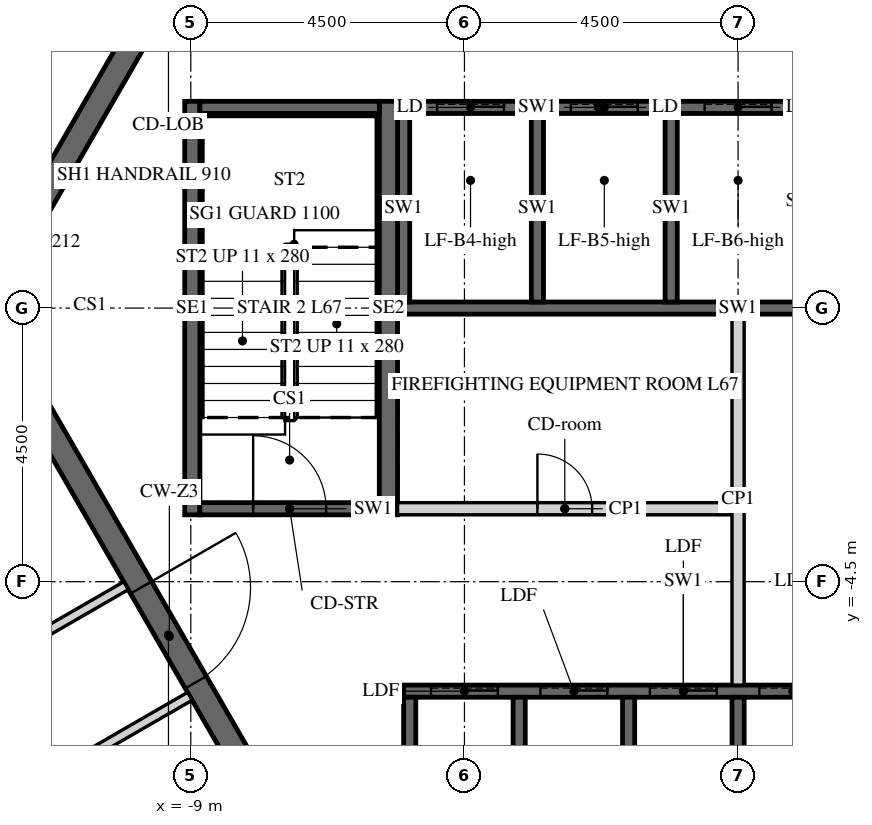
"""IFC4 building model, lengths in metres.
Left out: names, types, materials, properties, quantities, classifications, styles, units other than length and angle.
Written with IfcOpenShell. Run it as: python <this file> out.ifc"""

import sys

from ifc_helpers import new_model, si_unit, direction, frame, frame_2d, origin, place, context, subcontext, project, spatial, polyline, rectangle, outline, extrude, element, fill, save


model = new_model("IFC4")
c1 = context("Model", 3, precision=1e-05, world=origin(), true_north=direction((0.0, 1.0)))
c2 = subcontext(c1, "Body", "Model", "MODEL_VIEW")
j1 = project(units=[si_unit("LENGTHUNIT", "METRE"), si_unit("PLANEANGLEUNIT", "RADIAN")], contexts=[c1])
p1 = place(None, origin())
s1 = spatial("IfcSite", under=j1, at=p1, CompositionType="ELEMENT")
p2 = place(p1, origin())
s2 = spatial("IfcBuilding", under=s1, at=p2, CompositionType="ELEMENT")
p3 = place(p2, frame((0.0, 0.0, 279.6)))
s3 = spatial("IfcBuildingStorey", under=s2, at=p3, CompositionType="ELEMENT", Elevation=279.6)
p4 = place(p3, frame((-6.235, 10.8, -0.15), z_axis=(0.0, 0.0, 1.0), x_axis=(-0.499996419489, -0.866027470984, 0.0)))
e1 = element("IfcWall", 1, at=p4, inside=s3, PredefinedType="SHEAR", context=c2, shape_type="SweptSolid", body=[
    extrude(outline(polyline([(-0.115, -0.2), (12.586, -0.2), (12.355, 0.2), (0.115, 0.2), (-0.115, -0.2)])), origin(), (0.0, 0.0, 1.0), 3.9),
])
p5 = place(p4, frame((5.364, 0.0, 0.15)))
e2 = element("IfcOpeningElement", 2, at=p5, cuts=e1, PredefinedType="OPENING", context=c2, shape_type="SweptSolid", body=[
    extrude(rectangle(XDim=1.8, YDim=2.4, at=frame_2d((0.9, 1.2))), frame((0.0, 0.21, 0.0), z_axis=(0.0, -1.0, 0.0), x_axis=(1.0, 0.0, 0.0)), (0.0, 0.0, 1.0), 0.42),
])
p6 = place(p3, frame((-12.471, 0.0, -0.15), z_axis=(0.0, 0.0, 1.0), x_axis=(0.499996419489, -0.866027470984, 0.0)))
e3 = element("IfcWall", 3, at=p6, inside=s3, PredefinedType="SHEAR", context=c2, shape_type="SweptSolid", body=[
    extrude(outline(polyline([(-0.115, -0.2), (12.586, -0.2), (12.355, 0.2), (0.115, 0.2), (-0.115, -0.2)])), origin(), (0.0, 0.0, 1.0), 3.9),
])
p7 = place(p6, frame((5.306, 0.0, 0.15)))
e4 = element("IfcOpeningElement", 4, at=p7, cuts=e3, PredefinedType="OPENING", context=c2, shape_type="SweptSolid", body=[
    extrude(rectangle(XDim=1.8, YDim=2.4, at=frame_2d((0.9, 1.2))), frame((0.0, 0.21, 0.0), z_axis=(0.0, -1.0, 0.0), x_axis=(1.0, 0.0, 0.0)), (0.0, 0.0, 1.0), 0.42),
])
p8 = place(p3, frame((-5.6, 3.3, -0.25), z_axis=(0.0, 0.0, 1.0), x_axis=(1.0, 0.0, 0.0)))
e5 = element("IfcWall", 5, at=p8, inside=s3, PredefinedType="SHEAR", context=c2, shape_type="SweptSolid", body=[
    extrude(rectangle(XDim=6.6, YDim=0.2, at=frame_2d((3.3, 0.0))), origin(), (0.0, 0.0, 1.0), 3.9),
])
p9 = place(p8, frame((0.65, 0.0, 0.25)))
e6 = element("IfcOpeningElement", 6, at=p9, cuts=e5, PredefinedType="OPENING", context=c2, shape_type="SweptSolid", body=[
    extrude(rectangle(XDim=1.1, YDim=2.1, at=frame_2d((0.55, 1.05))), frame((0.0, 0.11, 0.0), z_axis=(0.0, -1.0, 0.0), x_axis=(1.0, 0.0, 0.0)), (0.0, 0.0, 1.0), 0.22),
])
p10 = place(p8, frame((2.85, 0.0, 0.25)))
e7 = element("IfcOpeningElement", 7, at=p10, cuts=e5, PredefinedType="OPENING", context=c2, shape_type="SweptSolid", body=[
    extrude(rectangle(XDim=1.1, YDim=2.1, at=frame_2d((0.55, 1.05))), frame((0.0, 0.11, 0.0), z_axis=(0.0, -1.0, 0.0), x_axis=(1.0, 0.0, 0.0)), (0.0, 0.0, 1.0), 0.22),
])
p11 = place(p8, frame((5.05, 0.0, 0.25)))
e8 = element("IfcOpeningElement", 8, at=p11, cuts=e5, PredefinedType="OPENING", context=c2, shape_type="SweptSolid", body=[
    extrude(rectangle(XDim=1.1, YDim=2.1, at=frame_2d((0.55, 1.05))), frame((0.0, 0.11, 0.0), z_axis=(0.0, -1.0, 0.0), x_axis=(1.0, 0.0, 0.0)), (0.0, 0.0, 1.0), 0.22),
])
p12 = place(p3, frame((-5.6, 0.0, -0.25), z_axis=(0.0, 0.0, 1.0), x_axis=(1.0, 0.0, 0.0)))
e9 = element("IfcWall", 9, at=p12, inside=s3, PredefinedType="SHEAR", context=c2, shape_type="SweptSolid", body=[
    extrude(rectangle(XDim=11.2, YDim=0.2, at=frame_2d((5.6, 0.0))), origin(), (0.0, 0.0, 1.0), 3.9),
])
for number, where, z_axis, x_axis in (
    (10, (-5.5, 0.1, -0.25), (0.0, 0.0, 1.0), (0.0, 1.0, 0.0)),
    (11, (-3.3, 0.1, -0.25), (0.0, 0.0, 1.0), (0.0, 1.0, 0.0)),
    (12, (-1.1, 0.1, -0.25), (0.0, 0.0, 1.0), (0.0, 1.0, 0.0)),
):
    element("IfcWall", number, at=place(p3, frame(where, z_axis=z_axis, x_axis=x_axis)), inside=s3, PredefinedType="SHEAR", context=c2, shape_type="SweptSolid", body=[
        extrude(rectangle(XDim=3.1, YDim=0.2, at=frame_2d((1.55, 0.0))), origin(), (0.0, 0.0, 1.0), 3.9),
    ])
p13 = place(p3, frame((-5.5, -6.3, -0.25), z_axis=(0.0, 0.0, 1.0), x_axis=(1.0, 0.0, 0.0)))
e13 = element("IfcWall", 13, at=p13, inside=s3, PredefinedType="SHEAR", context=c2, shape_type="SweptSolid", body=[
    extrude(rectangle(XDim=9.2, YDim=0.2, at=frame_2d((4.6, 0.0))), origin(), (0.0, 0.0, 1.0), 3.9),
])
p14 = place(p13, frame((0.45, 0.0, 0.25)))
e14 = element("IfcOpeningElement", 14, at=p14, cuts=e13, PredefinedType="OPENING", context=c2, shape_type="SweptSolid", body=[
    extrude(rectangle(XDim=1.1, YDim=2.1, at=frame_2d((0.55, 1.05))), frame((0.0, 0.11, 0.0), z_axis=(0.0, -1.0, 0.0), x_axis=(1.0, 0.0, 0.0)), (0.0, 0.0, 1.0), 0.22),
])
p15 = place(p13, frame((2.25, 0.0, 0.25)))
e15 = element("IfcOpeningElement", 15, at=p15, cuts=e13, PredefinedType="OPENING", context=c2, shape_type="SweptSolid", body=[
    extrude(rectangle(XDim=1.1, YDim=2.1, at=frame_2d((0.55, 1.05))), frame((0.0, 0.11, 0.0), z_axis=(0.0, -1.0, 0.0), x_axis=(1.0, 0.0, 0.0)), (0.0, 0.0, 1.0), 0.22),
])
p16 = place(p13, frame((4.05, 0.0, 0.25)))
e16 = element("IfcOpeningElement", 16, at=p16, cuts=e13, PredefinedType="OPENING", context=c2, shape_type="SweptSolid", body=[
    extrude(rectangle(XDim=1.1, YDim=2.1, at=frame_2d((0.55, 1.05))), frame((0.0, 0.11, 0.0), z_axis=(0.0, -1.0, 0.0), x_axis=(1.0, 0.0, 0.0)), (0.0, 0.0, 1.0), 0.22),
])
p17 = place(p13, frame((5.85, 0.0, 0.25)))
e17 = element("IfcOpeningElement", 17, at=p17, cuts=e13, PredefinedType="OPENING", context=c2, shape_type="SweptSolid", body=[
    extrude(rectangle(XDim=1.1, YDim=2.1, at=frame_2d((0.55, 1.05))), frame((0.0, 0.11, 0.0), z_axis=(0.0, -1.0, 0.0), x_axis=(1.0, 0.0, 0.0)), (0.0, 0.0, 1.0), 0.22),
])
p18 = place(p13, frame((7.65, 0.0, 0.25)))
e18 = element("IfcOpeningElement", 18, at=p18, cuts=e13, PredefinedType="OPENING", context=c2, shape_type="SweptSolid", body=[
    extrude(rectangle(XDim=1.1, YDim=2.1, at=frame_2d((0.55, 1.05))), frame((0.0, 0.11, 0.0), z_axis=(0.0, -1.0, 0.0), x_axis=(1.0, 0.0, 0.0)), (0.0, 0.0, 1.0), 0.22),
])
for number, where, z_axis, x_axis in (
    (19, (-5.4, -9.3, -0.25), (0.0, 0.0, 1.0), (0.0, 1.0, 0.0)),
    (20, (-3.6, -9.3, -0.25), (0.0, 0.0, 1.0), (0.0, 1.0, 0.0)),
    (21, (-1.8, -9.3, -0.25), (0.0, 0.0, 1.0), (0.0, 1.0, 0.0)),
    (22, (0.0, -9.3, -0.25), (0.0, 0.0, 1.0), (0.0, 1.0, 0.0)),
):
    element("IfcWall", number, at=place(p3, frame(where, z_axis=z_axis, x_axis=x_axis)), inside=s3, PredefinedType="SHEAR", context=c2, shape_type="SweptSolid", body=[
        extrude(rectangle(XDim=2.9, YDim=0.2, at=frame_2d((1.45, 0.0))), origin(), (0.0, 0.0, 1.0), 3.9),
    ])
p19 = place(p3, frame((-5.6, -3.3, 0.0), z_axis=(0.0, 0.0, 1.0), x_axis=(1.0, 0.0, 0.0)))
e23 = element("IfcWall", 23, at=p19, inside=s3, PredefinedType="PARTITIONING", context=c2, shape_type="SweptSolid", body=[
    extrude(rectangle(XDim=5.5, YDim=0.2, at=frame_2d((2.75, 0.0))), origin(), (0.0, 0.0, 1.0), 3.65),
])
p20 = place(p19, frame((2.3, 0.0, 0.0)))
e24 = element("IfcOpeningElement", 24, at=p20, cuts=e23, PredefinedType="OPENING", context=c2, shape_type="SweptSolid", body=[
    extrude(rectangle(XDim=0.9, YDim=2.1, at=frame_2d((0.45, 1.05))), frame((0.0, 0.11, 0.0), z_axis=(0.0, -1.0, 0.0), x_axis=(1.0, 0.0, 0.0)), (0.0, 0.0, 1.0), 0.22),
])
p21 = place(p3, frame((0.0, -6.2, 0.0), z_axis=(0.0, 0.0, 1.0), x_axis=(0.0, 1.0, 0.0)))
e25 = element("IfcWall", 25, at=p21, inside=s3, PredefinedType="PARTITIONING", context=c2, shape_type="SweptSolid", body=[
    extrude(rectangle(XDim=6.1, YDim=0.2, at=frame_2d((3.05, 0.0))), origin(), (0.0, 0.0, 1.0), 3.65),
])
p22 = place(p3, frame((-5.75, -3.4, -0.25), z_axis=(0.0, 0.0, 1.0), x_axis=(0.0, 1.0, 0.0)))
e26 = element("IfcWall", 26, at=p22, inside=s3, PredefinedType="SHEAR", context=c2, shape_type="SweptSolid", body=[
    extrude(rectangle(XDim=6.8, YDim=0.3, at=frame_2d((3.4, 0.0))), origin(), (0.0, 0.0, 1.0), 3.9),
])
p23 = place(p3, frame((-8.975, -3.4, -0.25), z_axis=(0.0, 0.0, 1.0), x_axis=(0.0, 1.0, 0.0)))
e27 = element("IfcWall", 27, at=p23, inside=s3, PredefinedType="SHEAR", context=c2, shape_type="SweptSolid", body=[
    extrude(rectangle(XDim=6.8, YDim=0.25, at=frame_2d((3.4, 0.0))), origin(), (0.0, 0.0, 1.0), 3.9),
])
p24 = place(p3, frame((-8.85, 3.3, -0.25), z_axis=(0.0, 0.0, 1.0), x_axis=(1.0, 0.0, 0.0)))
e28 = element("IfcWall", 28, at=p24, inside=s3, PredefinedType="SHEAR", context=c2, shape_type="SweptSolid", body=[
    extrude(rectangle(XDim=2.95, YDim=0.2, at=frame_2d((1.475, 0.0))), origin(), (0.0, 0.0, 1.0), 3.9),
])
p25 = place(p3, frame((-8.85, -3.3, -0.25), z_axis=(0.0, 0.0, 1.0), x_axis=(1.0, 0.0, 0.0)))
e29 = element("IfcWall", 29, at=p25, inside=s3, PredefinedType="SHEAR", context=c2, shape_type="SweptSolid", body=[
    extrude(rectangle(XDim=2.95, YDim=0.2, at=frame_2d((1.475, 0.0))), origin(), (0.0, 0.0, 1.0), 3.9),
])
p26 = place(p25, frame((0.875, 0.0, 0.25)))
e30 = element("IfcOpeningElement", 30, at=p26, cuts=e29, PredefinedType="OPENING", context=c2, shape_type="SweptSolid", body=[
    extrude(rectangle(XDim=1.2, YDim=2.4, at=frame_2d((0.6, 1.2))), frame((0.0, 0.11, 0.0), z_axis=(0.0, -1.0, 0.0), x_axis=(1.0, 0.0, 0.0)), (0.0, 0.0, 1.0), 0.22),
])
p27 = place(p3, frame((-8.622, 17.225, 0.0), z_axis=(0.0, 0.0, 1.0), x_axis=(-0.438366544921, -0.898796290765, 0.0)))
e31 = element("IfcWall", 31, at=p27, inside=s3, PredefinedType="PARTITIONING", context=c2, shape_type="SweptSolid", body=[
    extrude(rectangle(XDim=17.273, YDim=0.15, at=frame_2d((8.637, 0.0))), origin(), (0.0, 0.0, 1.0), 2.988),
])
p28 = place(p27, frame((10.078, 0.0, 0.0)))
e32 = element("IfcOpeningElement", 32, at=p28, cuts=e31, PredefinedType="OPENING", context=c2, shape_type="SweptSolid", body=[
    extrude(rectangle(XDim=1.0, YDim=2.1, at=frame_2d((0.5, 1.05))), frame((0.0, 0.085, 0.0), z_axis=(0.0, -1.0, 0.0), x_axis=(1.0, 0.0, 0.0)), (0.0, 0.0, 1.0), 0.17),
])
p29 = place(p3, frame((-18.338, -2.838, 0.0), z_axis=(0.0, 0.0, 1.0), x_axis=(0.499999693481, -0.866025580753, 0.0)))
e33 = element("IfcWall", 33, at=p29, inside=s3, PredefinedType="PARTITIONING", context=c2, shape_type="SweptSolid", body=[
    extrude(rectangle(XDim=15.296, YDim=0.15, at=frame_2d((7.648, 0.0))), origin(), (0.0, 0.0, 1.0), 2.988),
])
p30 = place(p29, frame((2.325, 0.0, 0.0)))
e34 = element("IfcOpeningElement", 34, at=p30, cuts=e33, PredefinedType="OPENING", context=c2, shape_type="SweptSolid", body=[
    extrude(rectangle(XDim=1.0, YDim=2.1, at=frame_2d((0.5, 1.05))), frame((0.0, 0.085, 0.0), z_axis=(0.0, -1.0, 0.0), x_axis=(1.0, 0.0, 0.0)), (0.0, 0.0, 1.0), 0.17),
])
p31 = place(p29, frame((12.136, 0.0, 0.0)))
e35 = element("IfcOpeningElement", 35, at=p31, cuts=e33, PredefinedType="OPENING", context=c2, shape_type="SweptSolid", body=[
    extrude(rectangle(XDim=1.0, YDim=2.1, at=frame_2d((0.5, 1.05))), frame((0.0, 0.085, 0.0), z_axis=(0.0, -1.0, 0.0), x_axis=(1.0, 0.0, 0.0)), (0.0, 0.0, 1.0), 0.17),
])
p32 = place(p3, frame((-10.066, -4.566, 0.0), z_axis=(0.0, 0.0, 1.0), x_axis=(-0.866037363387, -0.499979284789, 0.0)))
e36 = element("IfcWall", 36, at=p32, inside=s3, PredefinedType="PARTITIONING", context=c2, shape_type="SweptSolid", body=[
    extrude(rectangle(XDim=4.8, YDim=0.15, at=frame_2d((2.4, 0.0))), origin(), (0.0, 0.0, 1.0), 2.988),
])
p33 = place(p3, frame((-13.108, -8.747, 0.0), z_axis=(0.0, 0.0, 1.0), x_axis=(0.866024684746, 0.500001245408, 0.0)))
e37 = element("IfcWall", 37, at=p33, inside=s3, PredefinedType="PARTITIONING", context=c2, shape_type="SweptSolid", body=[
    extrude(rectangle(XDim=4.725, YDim=0.15, at=frame_2d((2.363, 0.0))), origin(), (0.0, 0.0, 1.0), 2.988),
])
p34 = place(p7, origin())
e38 = element("IfcDoor", 38, at=p34, inside=s3, OperationType="DOUBLE_DOOR_SINGLE_SWING", PredefinedType="DOOR", context=c2, shape_type="SweptSolid", body=[
    extrude(rectangle(XDim=1.8, YDim=2.4, at=frame_2d((0.9, 1.2))), frame((0.0, 0.025, 0.0), z_axis=(0.0, -1.0, 0.0), x_axis=(1.0, 0.0, 0.0)), (0.0, 0.0, 1.0), 0.05),
])
fill(e4, e38)
p35 = place(p20, origin())
e39 = element("IfcDoor", 39, at=p35, inside=s3, OperationType="SINGLE_SWING_LEFT", PredefinedType="DOOR", context=c2, shape_type="SweptSolid", body=[
    extrude(rectangle(XDim=0.9, YDim=2.1, at=frame_2d((0.45, 1.05))), frame((0.0, 0.025, 0.0), z_axis=(0.0, -1.0, 0.0), x_axis=(1.0, 0.0, 0.0)), (0.0, 0.0, 1.0), 0.05),
])
fill(e24, e39)
p36 = place(p26, origin())
e40 = element("IfcDoor", 40, at=p36, inside=s3, OperationType="SINGLE_SWING_LEFT", PredefinedType="DOOR", context=c2, shape_type="SweptSolid", body=[
    extrude(rectangle(XDim=1.2, YDim=2.4, at=frame_2d((0.6, 1.2))), frame((0.0, 0.025, 0.0), z_axis=(0.0, -1.0, 0.0), x_axis=(1.0, 0.0, 0.0)), (0.0, 0.0, 1.0), 0.05),
])
fill(e30, e40)
p37 = place(p9, origin())
e41 = element("IfcDoor", 41, at=p37, inside=s3, OperationType="SLIDING_TO_LEFT", PredefinedType="DOOR", context=c2, shape_type="SweptSolid", body=[
    extrude(rectangle(XDim=1.1, YDim=2.1, at=frame_2d((0.55, 1.05))), frame((0.0, 0.025, 0.0), z_axis=(0.0, -1.0, 0.0), x_axis=(1.0, 0.0, 0.0)), (0.0, 0.0, 1.0), 0.05),
])
fill(e6, e41)
p38 = place(p10, origin())
e42 = element("IfcDoor", 42, at=p38, inside=s3, OperationType="SLIDING_TO_LEFT", PredefinedType="DOOR", context=c2, shape_type="SweptSolid", body=[
    extrude(rectangle(XDim=1.1, YDim=2.1, at=frame_2d((0.55, 1.05))), frame((0.0, 0.025, 0.0), z_axis=(0.0, -1.0, 0.0), x_axis=(1.0, 0.0, 0.0)), (0.0, 0.0, 1.0), 0.05),
])
fill(e7, e42)
p39 = place(p11, origin())
e43 = element("IfcDoor", 43, at=p39, inside=s3, OperationType="SLIDING_TO_LEFT", PredefinedType="DOOR", context=c2, shape_type="SweptSolid", body=[
    extrude(rectangle(XDim=1.1, YDim=2.1, at=frame_2d((0.55, 1.05))), frame((0.0, 0.025, 0.0), z_axis=(0.0, -1.0, 0.0), x_axis=(1.0, 0.0, 0.0)), (0.0, 0.0, 1.0), 0.05),
])
fill(e8, e43)
p40 = place(p14, origin())
e44 = element("IfcDoor", 44, at=p40, inside=s3, OperationType="SLIDING_TO_LEFT", PredefinedType="DOOR", context=c2, shape_type="SweptSolid", body=[
    extrude(rectangle(XDim=1.1, YDim=2.1, at=frame_2d((0.55, 1.05))), frame((0.0, 0.025, 0.0), z_axis=(0.0, -1.0, 0.0), x_axis=(1.0, 0.0, 0.0)), (0.0, 0.0, 1.0), 0.05),
])
fill(e14, e44)
p41 = place(p15, origin())
e45 = element("IfcDoor", 45, at=p41, inside=s3, OperationType="SLIDING_TO_LEFT", PredefinedType="DOOR", context=c2, shape_type="SweptSolid", body=[
    extrude(rectangle(XDim=1.1, YDim=2.1, at=frame_2d((0.55, 1.05))), frame((0.0, 0.025, 0.0), z_axis=(0.0, -1.0, 0.0), x_axis=(1.0, 0.0, 0.0)), (0.0, 0.0, 1.0), 0.05),
])
fill(e15, e45)
p42 = place(p16, origin())
e46 = element("IfcDoor", 46, at=p42, inside=s3, OperationType="SLIDING_TO_LEFT", PredefinedType="DOOR", context=c2, shape_type="SweptSolid", body=[
    extrude(rectangle(XDim=1.1, YDim=2.1, at=frame_2d((0.55, 1.05))), frame((0.0, 0.025, 0.0), z_axis=(0.0, -1.0, 0.0), x_axis=(1.0, 0.0, 0.0)), (0.0, 0.0, 1.0), 0.05),
])
fill(e16, e46)
p43 = place(p17, origin())
e47 = element("IfcDoor", 47, at=p43, inside=s3, OperationType="SLIDING_TO_LEFT", PredefinedType="DOOR", context=c2, shape_type="SweptSolid", body=[
    extrude(rectangle(XDim=1.1, YDim=2.1, at=frame_2d((0.55, 1.05))), frame((0.0, 0.025, 0.0), z_axis=(0.0, -1.0, 0.0), x_axis=(1.0, 0.0, 0.0)), (0.0, 0.0, 1.0), 0.05),
])
fill(e17, e47)
save(model, sys.argv[1])
